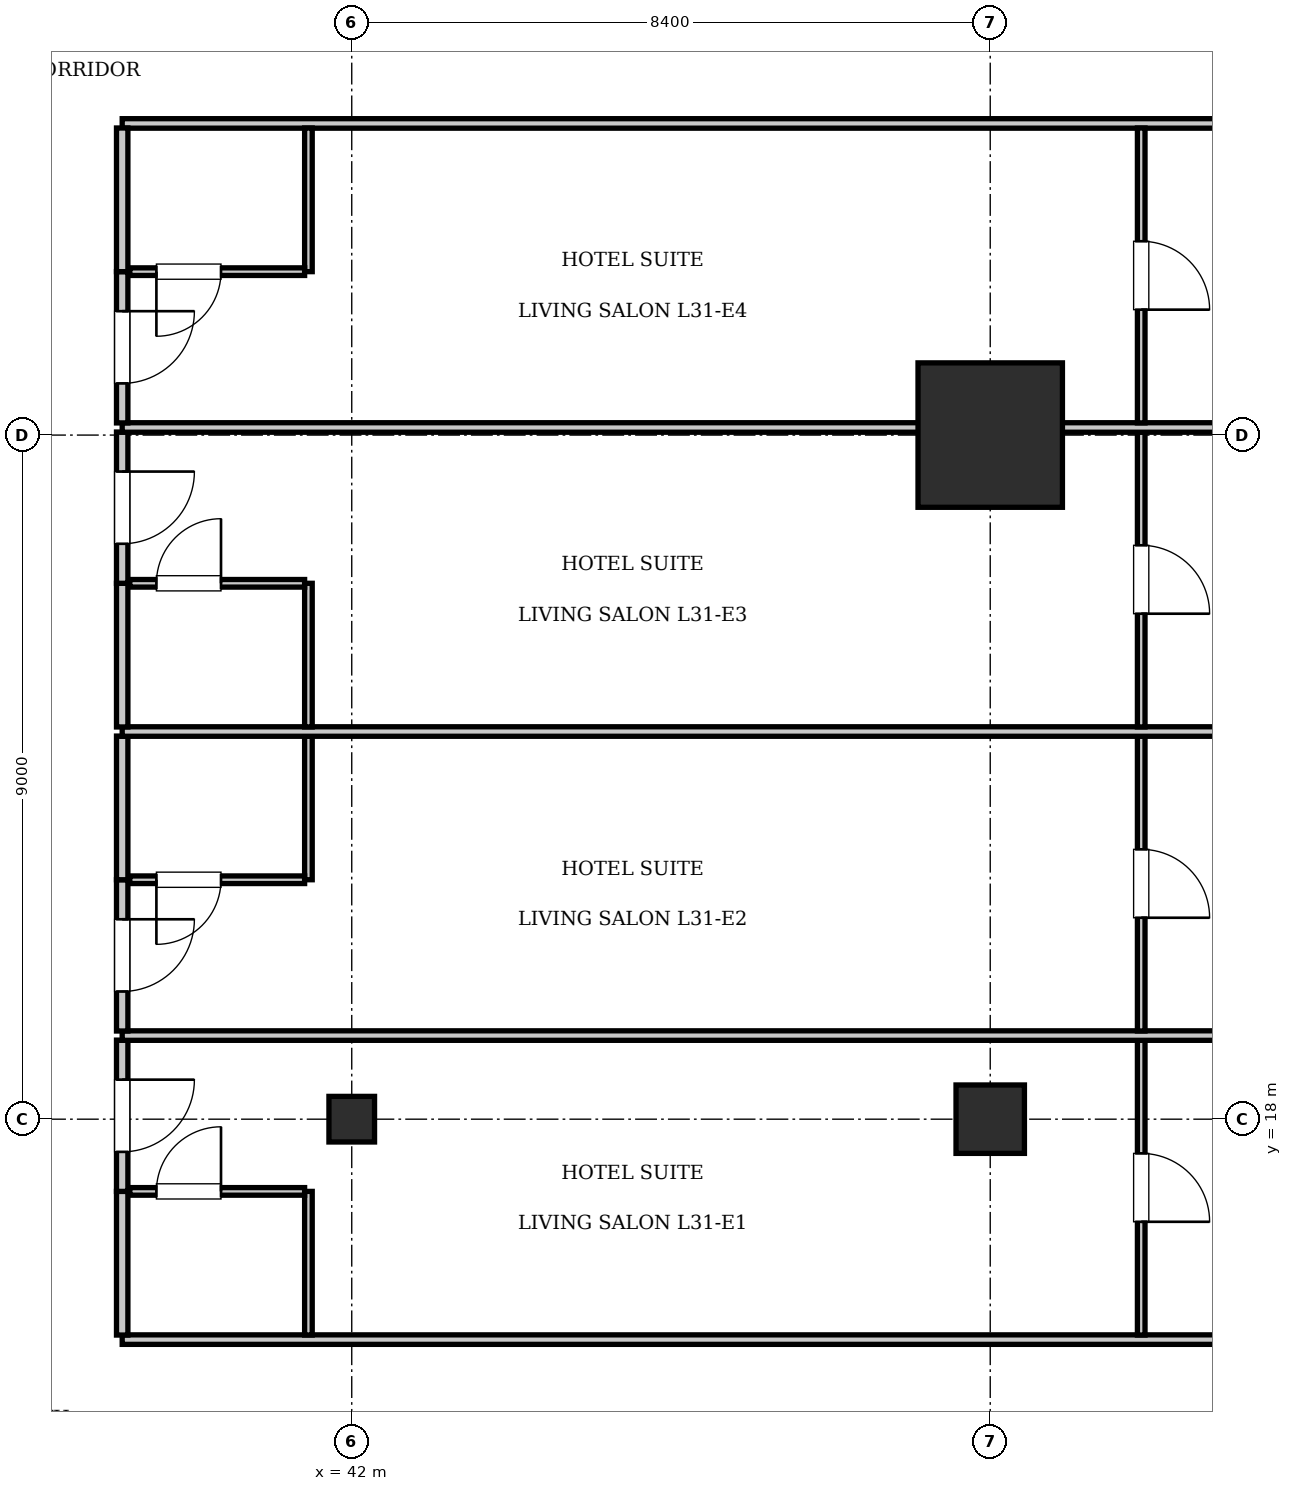
"""IFC4 building model, lengths in metres.
Left out: names, types, materials, properties, quantities, classifications, styles, units other than length and angle.
Written with IfcOpenShell. Run it as: python <this file> out.ifc"""

import sys

from ifc_helpers import new_model, si_unit, direction, frame, frame_2d, origin, origin_2d, place, context, subcontext, project, spatial, rectangle, i_section, extrude, element, fill, save


model = new_model("IFC4")
c1 = context("Model", 3, precision=1e-05, world=origin(), true_north=direction((0.0, 1.0)))
c2 = subcontext(c1, "Body", "Model", "MODEL_VIEW")
j1 = project(units=[si_unit("LENGTHUNIT", "METRE"), si_unit("PLANEANGLEUNIT", "RADIAN")], contexts=[c1])
p1 = place(None, origin())
s1 = spatial("IfcSite", under=j1, at=p1, CompositionType="ELEMENT")
p2 = place(p1, origin())
s2 = spatial("IfcBuilding", under=s1, at=p2, CompositionType="ELEMENT")
p3 = place(p2, frame((0.0, 0.0, 131.25)))
s3 = spatial("IfcBuildingStorey", under=s2, at=p3, CompositionType="ELEMENT", Elevation=131.25)
p4 = place(p3, frame((50.4, 27.0, 0.0), z_axis=(0.0, 0.0, 1.0), x_axis=(1.0, 0.0, 0.0)))
e1 = element("IfcColumn", 1, at=p4, inside=s3, PredefinedType="COLUMN", context=c2, shape_type="SweptSolid", body=[
    extrude(rectangle(XDim=1.9, YDim=1.9, at=origin_2d()), origin(), (0.0, 0.0, 1.0), 3.85),
])
p5 = place(p3, frame((50.4, 18.0, 0.0), z_axis=(0.0, 0.0, 1.0), x_axis=(1.0, 0.0, 0.0)))
e2 = element("IfcColumn", 2, at=p5, inside=s3, PredefinedType="COLUMN", context=c2, shape_type="SweptSolid", body=[
    extrude(rectangle(XDim=0.9, YDim=0.9, at=origin_2d()), origin(), (0.0, 0.0, 1.0), 3.85),
])
p6 = place(p3, frame((42.0, 18.0, 0.0), z_axis=(0.0, 0.0, 1.0), x_axis=(1.0, 0.0, 0.0)))
e3 = element("IfcColumn", 3, at=p6, inside=s3, PredefinedType="COLUMN", context=c2, shape_type="SweptSolid", body=[
    extrude(i_section(OverallWidth=0.6, OverallDepth=0.6, WebThickness=0.025, FlangeThickness=0.038, at=origin_2d()), origin(), (0.0, 0.0, 1.0), 3.85),
])
for number, where, z_axis, x_axis in (
    (4, (38.98, 15.1, 0.0), (0.0, 0.0, 1.0), (1.0, 0.0, 0.0)),
    (5, (38.98, 31.1, 0.0), (0.0, 0.0, 1.0), (1.0, 0.0, 0.0)),
):
    element("IfcWall", number, at=place(p3, frame(where, z_axis=z_axis, x_axis=x_axis)), inside=s3, PredefinedType="PARTITIONING", context=c2, shape_type="SweptSolid", body=[
        extrude(rectangle(XDim=23.42, YDim=0.125, at=frame_2d((11.71, 0.0))), origin(), (0.0, 0.0, 1.0), 3.61),
    ])
p7 = place(p3, frame((38.98, 15.16, 0.0), z_axis=(0.0, 0.0, 1.0), x_axis=(0.0, 1.0, 0.0)))
e6 = element("IfcWall", 6, at=p7, inside=s3, PredefinedType="PARTITIONING", context=c2, shape_type="SweptSolid", body=[
    extrude(rectangle(XDim=1.89, YDim=0.15, at=frame_2d((0.945, 0.0))), origin(), (0.0, 0.0, 1.0), 3.61),
])
p8 = place(p3, frame((38.98, 17.05, 0.0), z_axis=(0.0, 0.0, 1.0), x_axis=(0.0, 1.0, 0.0)))
e7 = element("IfcWall", 7, at=p8, inside=s3, PredefinedType="PARTITIONING", context=c2, shape_type="SweptSolid", body=[
    extrude(rectangle(XDim=1.99, YDim=0.15, at=frame_2d((0.995, 0.0))), origin(), (0.0, 0.0, 1.0), 3.61),
])
p9 = place(p8, frame((0.52, 0.0, 0.0)))
e8 = element("IfcOpeningElement", 8, at=p9, cuts=e7, PredefinedType="OPENING", context=c2, shape_type="SweptSolid", body=[
    extrude(rectangle(XDim=0.95, YDim=2.15, at=frame_2d((0.475, 1.075))), frame((0.0, 0.085, 0.0), z_axis=(0.0, -1.0, 0.0), x_axis=(1.0, 0.0, 0.0)), (0.0, 0.0, 1.0), 0.17),
])
p10 = place(p3, frame((41.43, 15.16, 0.0), z_axis=(0.0, 0.0, 1.0), x_axis=(0.0, 1.0, 0.0)))
e9 = element("IfcWall", 9, at=p10, inside=s3, PredefinedType="PARTITIONING", context=c2, shape_type="SweptSolid", body=[
    extrude(rectangle(XDim=1.89, YDim=0.1, at=frame_2d((0.945, 0.0))), origin(), (0.0, 0.0, 1.0), 3.61),
])
p11 = place(p3, frame((39.08, 17.05, 0.0), z_axis=(0.0, 0.0, 1.0), x_axis=(1.0, 0.0, 0.0)))
e10 = element("IfcWall", 10, at=p11, inside=s3, PredefinedType="PARTITIONING", context=c2, shape_type="SweptSolid", body=[
    extrude(rectangle(XDim=2.3, YDim=0.1, at=frame_2d((1.15, 0.0))), origin(), (0.0, 0.0, 1.0), 3.61),
])
p12 = place(p11, frame((0.35, 0.0, 0.0)))
e11 = element("IfcOpeningElement", 11, at=p12, cuts=e10, PredefinedType="OPENING", context=c2, shape_type="SweptSolid", body=[
    extrude(rectangle(XDim=0.85, YDim=2.1, at=frame_2d((0.425, 1.05))), frame((0.0, 0.06, 0.0), z_axis=(0.0, -1.0, 0.0), x_axis=(1.0, 0.0, 0.0)), (0.0, 0.0, 1.0), 0.12),
])
p13 = place(p3, frame((52.386, 15.16, 0.0), z_axis=(0.0, 0.0, 1.0), x_axis=(0.0, 1.0, 0.0)))
e12 = element("IfcWall", 12, at=p13, inside=s3, PredefinedType="PARTITIONING", context=c2, shape_type="SweptSolid", body=[
    extrude(rectangle(XDim=3.88, YDim=0.1, at=frame_2d((1.94, 0.0))), origin(), (0.0, 0.0, 1.0), 3.61),
])
p14 = place(p13, frame((1.49, 0.0, 0.0)))
e13 = element("IfcOpeningElement", 13, at=p14, cuts=e12, PredefinedType="OPENING", context=c2, shape_type="SweptSolid", body=[
    extrude(rectangle(XDim=0.9, YDim=2.1, at=frame_2d((0.45, 1.05))), frame((0.0, 0.06, 0.0), z_axis=(0.0, -1.0, 0.0), x_axis=(1.0, 0.0, 0.0)), (0.0, 0.0, 1.0), 0.12),
])
p15 = place(p3, frame((38.98, 19.1, 0.0), z_axis=(0.0, 0.0, 1.0), x_axis=(1.0, 0.0, 0.0)))
e14 = element("IfcWall", 14, at=p15, inside=s3, PredefinedType="PARTITIONING", context=c2, shape_type="SweptSolid", body=[
    extrude(rectangle(XDim=23.42, YDim=0.125, at=frame_2d((11.71, 0.0))), origin(), (0.0, 0.0, 1.0), 3.61),
])
p16 = place(p3, frame((38.98, 19.16, 0.0), z_axis=(0.0, 0.0, 1.0), x_axis=(0.0, 1.0, 0.0)))
e15 = element("IfcWall", 15, at=p16, inside=s3, PredefinedType="PARTITIONING", context=c2, shape_type="SweptSolid", body=[
    extrude(rectangle(XDim=1.99, YDim=0.15, at=frame_2d((0.995, 0.0))), origin(), (0.0, 0.0, 1.0), 3.61),
])
p17 = place(p16, frame((0.52, 0.0, 0.0)))
e16 = element("IfcOpeningElement", 16, at=p17, cuts=e15, PredefinedType="OPENING", context=c2, shape_type="SweptSolid", body=[
    extrude(rectangle(XDim=0.95, YDim=2.15, at=frame_2d((0.475, 1.075))), frame((0.0, 0.085, 0.0), z_axis=(0.0, -1.0, 0.0), x_axis=(1.0, 0.0, 0.0)), (0.0, 0.0, 1.0), 0.17),
])
p18 = place(p3, frame((38.98, 21.15, 0.0), z_axis=(0.0, 0.0, 1.0), x_axis=(0.0, 1.0, 0.0)))
e17 = element("IfcWall", 17, at=p18, inside=s3, PredefinedType="PARTITIONING", context=c2, shape_type="SweptSolid", body=[
    extrude(rectangle(XDim=1.89, YDim=0.15, at=frame_2d((0.945, 0.0))), origin(), (0.0, 0.0, 1.0), 3.61),
])
p19 = place(p3, frame((41.43, 21.15, 0.0), z_axis=(0.0, 0.0, 1.0), x_axis=(0.0, 1.0, 0.0)))
e18 = element("IfcWall", 18, at=p19, inside=s3, PredefinedType="PARTITIONING", context=c2, shape_type="SweptSolid", body=[
    extrude(rectangle(XDim=1.89, YDim=0.1, at=frame_2d((0.945, 0.0))), origin(), (0.0, 0.0, 1.0), 3.61),
])
p20 = place(p3, frame((39.08, 21.15, 0.0), z_axis=(0.0, 0.0, 1.0), x_axis=(1.0, 0.0, 0.0)))
e19 = element("IfcWall", 19, at=p20, inside=s3, PredefinedType="PARTITIONING", context=c2, shape_type="SweptSolid", body=[
    extrude(rectangle(XDim=2.3, YDim=0.1, at=frame_2d((1.15, 0.0))), origin(), (0.0, 0.0, 1.0), 3.61),
])
p21 = place(p20, frame((0.35, 0.0, 0.0)))
e20 = element("IfcOpeningElement", 20, at=p21, cuts=e19, PredefinedType="OPENING", context=c2, shape_type="SweptSolid", body=[
    extrude(rectangle(XDim=0.85, YDim=2.1, at=frame_2d((0.425, 1.05))), frame((0.0, 0.06, 0.0), z_axis=(0.0, -1.0, 0.0), x_axis=(1.0, 0.0, 0.0)), (0.0, 0.0, 1.0), 0.12),
])
p22 = place(p3, frame((52.386, 19.16, 0.0), z_axis=(0.0, 0.0, 1.0), x_axis=(0.0, 1.0, 0.0)))
e21 = element("IfcWall", 21, at=p22, inside=s3, PredefinedType="PARTITIONING", context=c2, shape_type="SweptSolid", body=[
    extrude(rectangle(XDim=3.88, YDim=0.1, at=frame_2d((1.94, 0.0))), origin(), (0.0, 0.0, 1.0), 3.61),
])
p23 = place(p22, frame((1.49, 0.0, 0.0)))
e22 = element("IfcOpeningElement", 22, at=p23, cuts=e21, PredefinedType="OPENING", context=c2, shape_type="SweptSolid", body=[
    extrude(rectangle(XDim=0.9, YDim=2.1, at=frame_2d((0.45, 1.05))), frame((0.0, 0.06, 0.0), z_axis=(0.0, -1.0, 0.0), x_axis=(1.0, 0.0, 0.0)), (0.0, 0.0, 1.0), 0.12),
])
p24 = place(p3, frame((38.98, 23.1, 0.0), z_axis=(0.0, 0.0, 1.0), x_axis=(1.0, 0.0, 0.0)))
e23 = element("IfcWall", 23, at=p24, inside=s3, PredefinedType="PARTITIONING", context=c2, shape_type="SweptSolid", body=[
    extrude(rectangle(XDim=23.42, YDim=0.125, at=frame_2d((11.71, 0.0))), origin(), (0.0, 0.0, 1.0), 3.61),
])
p25 = place(p3, frame((38.98, 23.16, 0.0), z_axis=(0.0, 0.0, 1.0), x_axis=(0.0, 1.0, 0.0)))
e24 = element("IfcWall", 24, at=p25, inside=s3, PredefinedType="PARTITIONING", context=c2, shape_type="SweptSolid", body=[
    extrude(rectangle(XDim=1.89, YDim=0.15, at=frame_2d((0.945, 0.0))), origin(), (0.0, 0.0, 1.0), 3.61),
])
p26 = place(p3, frame((38.98, 25.05, 0.0), z_axis=(0.0, 0.0, 1.0), x_axis=(0.0, 1.0, 0.0)))
e25 = element("IfcWall", 25, at=p26, inside=s3, PredefinedType="PARTITIONING", context=c2, shape_type="SweptSolid", body=[
    extrude(rectangle(XDim=1.99, YDim=0.15, at=frame_2d((0.995, 0.0))), origin(), (0.0, 0.0, 1.0), 3.61),
])
p27 = place(p26, frame((0.52, 0.0, 0.0)))
e26 = element("IfcOpeningElement", 26, at=p27, cuts=e25, PredefinedType="OPENING", context=c2, shape_type="SweptSolid", body=[
    extrude(rectangle(XDim=0.95, YDim=2.15, at=frame_2d((0.475, 1.075))), frame((0.0, 0.085, 0.0), z_axis=(0.0, -1.0, 0.0), x_axis=(1.0, 0.0, 0.0)), (0.0, 0.0, 1.0), 0.17),
])
p28 = place(p3, frame((41.43, 23.16, 0.0), z_axis=(0.0, 0.0, 1.0), x_axis=(0.0, 1.0, 0.0)))
e27 = element("IfcWall", 27, at=p28, inside=s3, PredefinedType="PARTITIONING", context=c2, shape_type="SweptSolid", body=[
    extrude(rectangle(XDim=1.89, YDim=0.1, at=frame_2d((0.945, 0.0))), origin(), (0.0, 0.0, 1.0), 3.61),
])
p29 = place(p3, frame((39.08, 25.05, 0.0), z_axis=(0.0, 0.0, 1.0), x_axis=(1.0, 0.0, 0.0)))
e28 = element("IfcWall", 28, at=p29, inside=s3, PredefinedType="PARTITIONING", context=c2, shape_type="SweptSolid", body=[
    extrude(rectangle(XDim=2.3, YDim=0.1, at=frame_2d((1.15, 0.0))), origin(), (0.0, 0.0, 1.0), 3.61),
])
p30 = place(p29, frame((0.35, 0.0, 0.0)))
e29 = element("IfcOpeningElement", 29, at=p30, cuts=e28, PredefinedType="OPENING", context=c2, shape_type="SweptSolid", body=[
    extrude(rectangle(XDim=0.85, YDim=2.1, at=frame_2d((0.425, 1.05))), frame((0.0, 0.06, 0.0), z_axis=(0.0, -1.0, 0.0), x_axis=(1.0, 0.0, 0.0)), (0.0, 0.0, 1.0), 0.12),
])
p31 = place(p3, frame((52.386, 23.16, 0.0), z_axis=(0.0, 0.0, 1.0), x_axis=(0.0, 1.0, 0.0)))
e30 = element("IfcWall", 30, at=p31, inside=s3, PredefinedType="PARTITIONING", context=c2, shape_type="SweptSolid", body=[
    extrude(rectangle(XDim=3.88, YDim=0.1, at=frame_2d((1.94, 0.0))), origin(), (0.0, 0.0, 1.0), 3.61),
])
p32 = place(p31, frame((1.49, 0.0, 0.0)))
e31 = element("IfcOpeningElement", 31, at=p32, cuts=e30, PredefinedType="OPENING", context=c2, shape_type="SweptSolid", body=[
    extrude(rectangle(XDim=0.9, YDim=2.1, at=frame_2d((0.45, 1.05))), frame((0.0, 0.06, 0.0), z_axis=(0.0, -1.0, 0.0), x_axis=(1.0, 0.0, 0.0)), (0.0, 0.0, 1.0), 0.12),
])
p33 = place(p3, frame((38.98, 27.1, 0.0), z_axis=(0.0, 0.0, 1.0), x_axis=(1.0, 0.0, 0.0)))
e32 = element("IfcWall", 32, at=p33, inside=s3, PredefinedType="PARTITIONING", context=c2, shape_type="SweptSolid", body=[
    extrude(rectangle(XDim=23.42, YDim=0.125, at=frame_2d((11.71, 0.0))), origin(), (0.0, 0.0, 1.0), 2.41),
])
p34 = place(p3, frame((38.98, 27.16, 0.0), z_axis=(0.0, 0.0, 1.0), x_axis=(0.0, 1.0, 0.0)))
e33 = element("IfcWall", 33, at=p34, inside=s3, PredefinedType="PARTITIONING", context=c2, shape_type="SweptSolid", body=[
    extrude(rectangle(XDim=1.99, YDim=0.15, at=frame_2d((0.995, 0.0))), origin(), (0.0, 0.0, 1.0), 3.61),
])
p35 = place(p34, frame((0.52, 0.0, 0.0)))
e34 = element("IfcOpeningElement", 34, at=p35, cuts=e33, PredefinedType="OPENING", context=c2, shape_type="SweptSolid", body=[
    extrude(rectangle(XDim=0.95, YDim=2.15, at=frame_2d((0.475, 1.075))), frame((0.0, 0.085, 0.0), z_axis=(0.0, -1.0, 0.0), x_axis=(1.0, 0.0, 0.0)), (0.0, 0.0, 1.0), 0.17),
])
p36 = place(p3, frame((38.98, 29.15, 0.0), z_axis=(0.0, 0.0, 1.0), x_axis=(0.0, 1.0, 0.0)))
e35 = element("IfcWall", 35, at=p36, inside=s3, PredefinedType="PARTITIONING", context=c2, shape_type="SweptSolid", body=[
    extrude(rectangle(XDim=1.89, YDim=0.15, at=frame_2d((0.945, 0.0))), origin(), (0.0, 0.0, 1.0), 3.61),
])
p37 = place(p3, frame((41.43, 29.15, 0.0), z_axis=(0.0, 0.0, 1.0), x_axis=(0.0, 1.0, 0.0)))
e36 = element("IfcWall", 36, at=p37, inside=s3, PredefinedType="PARTITIONING", context=c2, shape_type="SweptSolid", body=[
    extrude(rectangle(XDim=1.89, YDim=0.1, at=frame_2d((0.945, 0.0))), origin(), (0.0, 0.0, 1.0), 3.61),
])
p38 = place(p3, frame((39.08, 29.15, 0.0), z_axis=(0.0, 0.0, 1.0), x_axis=(1.0, 0.0, 0.0)))
e37 = element("IfcWall", 37, at=p38, inside=s3, PredefinedType="PARTITIONING", context=c2, shape_type="SweptSolid", body=[
    extrude(rectangle(XDim=2.3, YDim=0.1, at=frame_2d((1.15, 0.0))), origin(), (0.0, 0.0, 1.0), 3.61),
])
p39 = place(p38, frame((0.35, 0.0, 0.0)))
e38 = element("IfcOpeningElement", 38, at=p39, cuts=e37, PredefinedType="OPENING", context=c2, shape_type="SweptSolid", body=[
    extrude(rectangle(XDim=0.85, YDim=2.1, at=frame_2d((0.425, 1.05))), frame((0.0, 0.06, 0.0), z_axis=(0.0, -1.0, 0.0), x_axis=(1.0, 0.0, 0.0)), (0.0, 0.0, 1.0), 0.12),
])
p40 = place(p3, frame((52.386, 27.16, 0.0), z_axis=(0.0, 0.0, 1.0), x_axis=(0.0, 1.0, 0.0)))
e39 = element("IfcWall", 39, at=p40, inside=s3, PredefinedType="PARTITIONING", context=c2, shape_type="SweptSolid", body=[
    extrude(rectangle(XDim=3.88, YDim=0.1, at=frame_2d((1.94, 0.0))), origin(), (0.0, 0.0, 1.0), 3.61),
])
p41 = place(p40, frame((1.49, 0.0, 0.0)))
e40 = element("IfcOpeningElement", 40, at=p41, cuts=e39, PredefinedType="OPENING", context=c2, shape_type="SweptSolid", body=[
    extrude(rectangle(XDim=0.9, YDim=2.1, at=frame_2d((0.45, 1.05))), frame((0.0, 0.06, 0.0), z_axis=(0.0, -1.0, 0.0), x_axis=(1.0, 0.0, 0.0)), (0.0, 0.0, 1.0), 0.12),
])
p42 = place(p12, origin())
e41 = element("IfcDoor", 41, at=p42, inside=s3, OperationType="SINGLE_SWING_RIGHT", PredefinedType="DOOR", context=c2, shape_type="SweptSolid", body=[
    extrude(rectangle(XDim=0.85, YDim=2.1, at=frame_2d((0.425, 1.05))), frame((0.0, 0.025, 0.0), z_axis=(0.0, -1.0, 0.0), x_axis=(1.0, 0.0, 0.0)), (0.0, 0.0, 1.0), 0.05),
])
fill(e11, e41)
p43 = place(p9, frame((0.95, 0.0, 0.0), z_axis=(0.0, 0.0, 1.0), x_axis=(-1.0, 0.0, 0.0)))
e42 = element("IfcDoor", 42, at=p43, inside=s3, OperationType="SINGLE_SWING_LEFT", PredefinedType="DOOR", context=c2, shape_type="SweptSolid", body=[
    extrude(rectangle(XDim=0.95, YDim=2.15, at=frame_2d((0.475, 1.075))), frame((0.0, 0.025, 0.0), z_axis=(0.0, -1.0, 0.0), x_axis=(1.0, 0.0, 0.0)), (0.0, 0.0, 1.0), 0.05),
])
fill(e8, e42)
p44 = place(p14, frame((0.9, 0.0, 0.0), z_axis=(0.0, 0.0, 1.0), x_axis=(-1.0, 0.0, 0.0)))
e43 = element("IfcDoor", 43, at=p44, inside=s3, OperationType="SINGLE_SWING_RIGHT", PredefinedType="DOOR", context=c2, shape_type="SweptSolid", body=[
    extrude(rectangle(XDim=0.9, YDim=2.1, at=frame_2d((0.45, 1.05))), frame((0.0, 0.025, 0.0), z_axis=(0.0, -1.0, 0.0), x_axis=(1.0, 0.0, 0.0)), (0.0, 0.0, 1.0), 0.05),
])
fill(e13, e43)
p45 = place(p21, frame((0.85, 0.0, 0.0), z_axis=(0.0, 0.0, 1.0), x_axis=(-1.0, 0.0, 0.0)))
e44 = element("IfcDoor", 44, at=p45, inside=s3, OperationType="SINGLE_SWING_RIGHT", PredefinedType="DOOR", context=c2, shape_type="SweptSolid", body=[
    extrude(rectangle(XDim=0.85, YDim=2.1, at=frame_2d((0.425, 1.05))), frame((0.0, 0.025, 0.0), z_axis=(0.0, -1.0, 0.0), x_axis=(1.0, 0.0, 0.0)), (0.0, 0.0, 1.0), 0.05),
])
fill(e20, e44)
p46 = place(p17, frame((0.95, 0.0, 0.0), z_axis=(0.0, 0.0, 1.0), x_axis=(-1.0, 0.0, 0.0)))
e45 = element("IfcDoor", 45, at=p46, inside=s3, OperationType="SINGLE_SWING_LEFT", PredefinedType="DOOR", context=c2, shape_type="SweptSolid", body=[
    extrude(rectangle(XDim=0.95, YDim=2.15, at=frame_2d((0.475, 1.075))), frame((0.0, 0.025, 0.0), z_axis=(0.0, -1.0, 0.0), x_axis=(1.0, 0.0, 0.0)), (0.0, 0.0, 1.0), 0.05),
])
fill(e16, e45)
p47 = place(p23, frame((0.9, 0.0, 0.0), z_axis=(0.0, 0.0, 1.0), x_axis=(-1.0, 0.0, 0.0)))
e46 = element("IfcDoor", 46, at=p47, inside=s3, OperationType="SINGLE_SWING_RIGHT", PredefinedType="DOOR", context=c2, shape_type="SweptSolid", body=[
    extrude(rectangle(XDim=0.9, YDim=2.1, at=frame_2d((0.45, 1.05))), frame((0.0, 0.025, 0.0), z_axis=(0.0, -1.0, 0.0), x_axis=(1.0, 0.0, 0.0)), (0.0, 0.0, 1.0), 0.05),
])
fill(e22, e46)
p48 = place(p30, origin())
e47 = element("IfcDoor", 47, at=p48, inside=s3, OperationType="SINGLE_SWING_RIGHT", PredefinedType="DOOR", context=c2, shape_type="SweptSolid", body=[
    extrude(rectangle(XDim=0.85, YDim=2.1, at=frame_2d((0.425, 1.05))), frame((0.0, 0.025, 0.0), z_axis=(0.0, -1.0, 0.0), x_axis=(1.0, 0.0, 0.0)), (0.0, 0.0, 1.0), 0.05),
])
fill(e29, e47)
p49 = place(p27, frame((0.95, 0.0, 0.0), z_axis=(0.0, 0.0, 1.0), x_axis=(-1.0, 0.0, 0.0)))
e48 = element("IfcDoor", 48, at=p49, inside=s3, OperationType="SINGLE_SWING_LEFT", PredefinedType="DOOR", context=c2, shape_type="SweptSolid", body=[
    extrude(rectangle(XDim=0.95, YDim=2.15, at=frame_2d((0.475, 1.075))), frame((0.0, 0.025, 0.0), z_axis=(0.0, -1.0, 0.0), x_axis=(1.0, 0.0, 0.0)), (0.0, 0.0, 1.0), 0.05),
])
fill(e26, e48)
p50 = place(p32, frame((0.9, 0.0, 0.0), z_axis=(0.0, 0.0, 1.0), x_axis=(-1.0, 0.0, 0.0)))
e49 = element("IfcDoor", 49, at=p50, inside=s3, OperationType="SINGLE_SWING_RIGHT", PredefinedType="DOOR", context=c2, shape_type="SweptSolid", body=[
    extrude(rectangle(XDim=0.9, YDim=2.1, at=frame_2d((0.45, 1.05))), frame((0.0, 0.025, 0.0), z_axis=(0.0, -1.0, 0.0), x_axis=(1.0, 0.0, 0.0)), (0.0, 0.0, 1.0), 0.05),
])
fill(e31, e49)
p51 = place(p39, frame((0.85, 0.0, 0.0), z_axis=(0.0, 0.0, 1.0), x_axis=(-1.0, 0.0, 0.0)))
e50 = element("IfcDoor", 50, at=p51, inside=s3, OperationType="SINGLE_SWING_RIGHT", PredefinedType="DOOR", context=c2, shape_type="SweptSolid", body=[
    extrude(rectangle(XDim=0.85, YDim=2.1, at=frame_2d((0.425, 1.05))), frame((0.0, 0.025, 0.0), z_axis=(0.0, -1.0, 0.0), x_axis=(1.0, 0.0, 0.0)), (0.0, 0.0, 1.0), 0.05),
])
fill(e38, e50)
p52 = place(p35, frame((0.95, 0.0, 0.0), z_axis=(0.0, 0.0, 1.0), x_axis=(-1.0, 0.0, 0.0)))
e51 = element("IfcDoor", 51, at=p52, inside=s3, OperationType="SINGLE_SWING_LEFT", PredefinedType="DOOR", context=c2, shape_type="SweptSolid", body=[
    extrude(rectangle(XDim=0.95, YDim=2.15, at=frame_2d((0.475, 1.075))), frame((0.0, 0.025, 0.0), z_axis=(0.0, -1.0, 0.0), x_axis=(1.0, 0.0, 0.0)), (0.0, 0.0, 1.0), 0.05),
])
fill(e34, e51)
p53 = place(p41, frame((0.9, 0.0, 0.0), z_axis=(0.0, 0.0, 1.0), x_axis=(-1.0, 0.0, 0.0)))
e52 = element("IfcDoor", 52, at=p53, inside=s3, OperationType="SINGLE_SWING_RIGHT", PredefinedType="DOOR", context=c2, shape_type="SweptSolid", body=[
    extrude(rectangle(XDim=0.9, YDim=2.1, at=frame_2d((0.45, 1.05))), frame((0.0, 0.025, 0.0), z_axis=(0.0, -1.0, 0.0), x_axis=(1.0, 0.0, 0.0)), (0.0, 0.0, 1.0), 0.05),
])
fill(e40, e52)
save(model, sys.argv[1])
